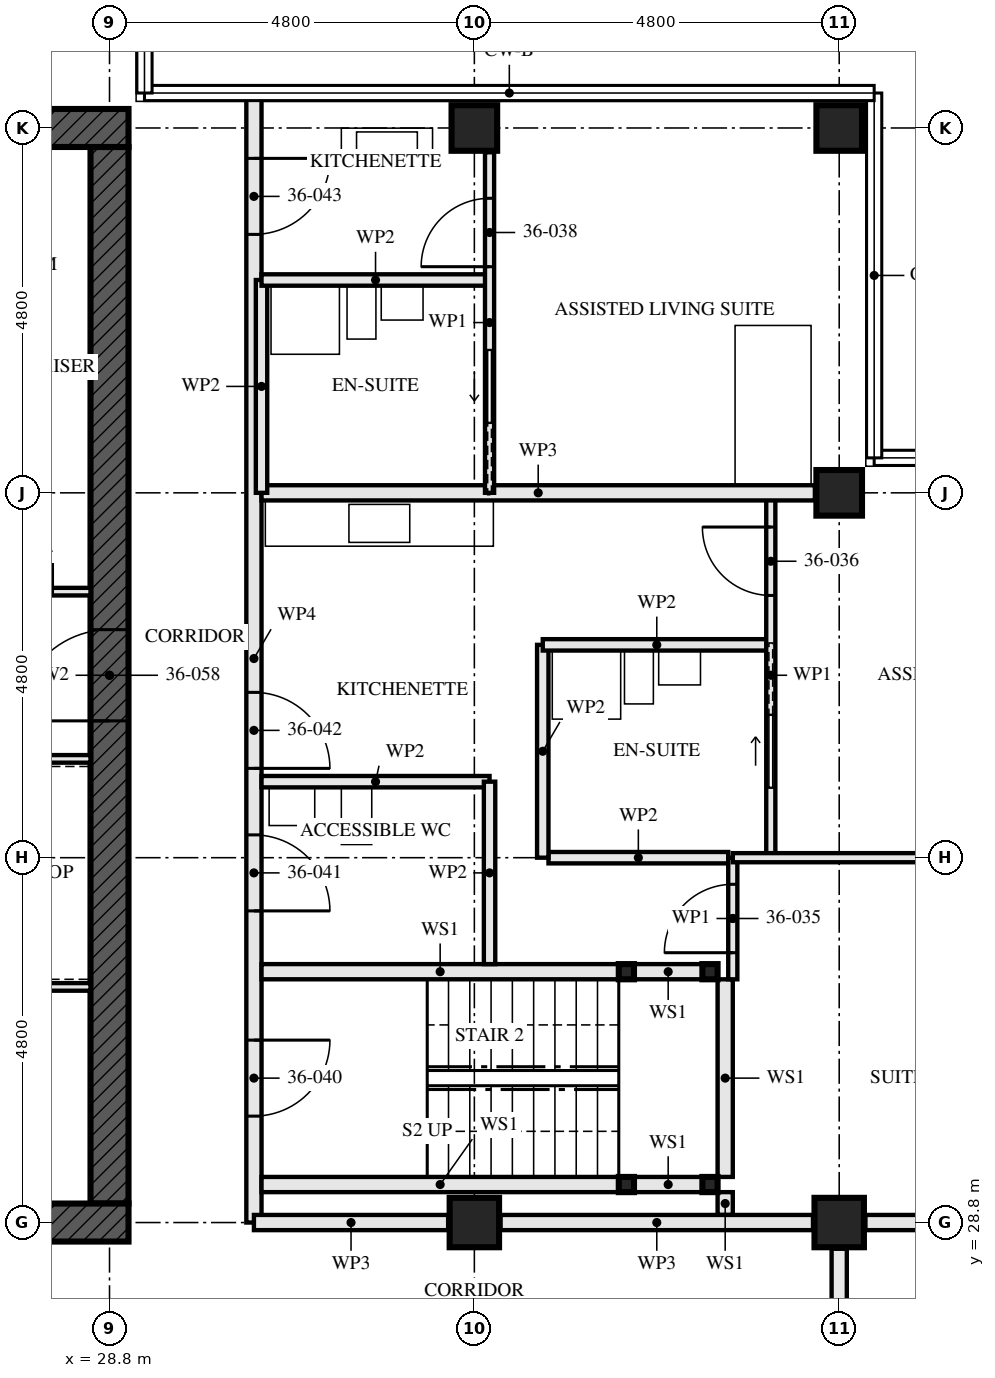
"""IFC4 building model, lengths in metres.
Left out: names, types, materials, properties, quantities, classifications, styles, units other than length and angle.
Written with IfcOpenShell. Run it as: python <this file> out.ifc"""

import sys

from ifc_helpers import new_model, si_unit, direction, frame, frame_2d, origin, origin_2d, place, context, subcontext, project, spatial, rectangle, hollow_rectangle, extrude, element, fill, save


model = new_model("IFC4")
c1 = context("Model", 3, precision=1e-05, world=origin(), true_north=direction((0.0, 1.0)))
c2 = subcontext(c1, "Body", "Model", "MODEL_VIEW")
j1 = project(units=[si_unit("LENGTHUNIT", "METRE"), si_unit("PLANEANGLEUNIT", "RADIAN")], contexts=[c1])
p1 = place(None, origin())
s1 = spatial("IfcSite", under=j1, at=p1, CompositionType="ELEMENT")
p2 = place(p1, origin())
s2 = spatial("IfcBuilding", under=s1, at=p2, CompositionType="ELEMENT")
p3 = place(p2, frame((0.0, 0.0, 133.0)))
s3 = spatial("IfcBuildingStorey", under=s2, at=p3, CompositionType="ELEMENT", Elevation=133.0)
p4 = place(p3, frame((33.6, 28.8, 0.0), z_axis=(0.0, 0.0, 1.0), x_axis=(0.0, 1.0, 0.0)))
e1 = element("IfcColumn", 1, at=p4, inside=s3, PredefinedType="COLUMN", context=c2, shape_type="SweptSolid", body=[
    extrude(hollow_rectangle(XDim=0.65, YDim=0.65, WallThickness=0.05, at=origin_2d()), origin(), (0.0, 0.0, 1.0), 3.5),
])
p5 = place(p3, frame((33.6, 43.2, 0.0), z_axis=(0.0, 0.0, 1.0), x_axis=(0.0, 1.0, 0.0)))
e2 = element("IfcColumn", 2, at=p5, inside=s3, PredefinedType="COLUMN", context=c2, shape_type="SweptSolid", body=[
    extrude(hollow_rectangle(XDim=0.6, YDim=0.6, WallThickness=0.08, at=origin_2d()), origin(), (0.0, 0.0, 1.0), 3.5),
])
p6 = place(p3, frame((38.4, 28.8, 0.0), z_axis=(0.0, 0.0, 1.0), x_axis=(0.0, 1.0, 0.0)))
e3 = element("IfcColumn", 3, at=p6, inside=s3, PredefinedType="COLUMN", context=c2, shape_type="SweptSolid", body=[
    extrude(hollow_rectangle(XDim=0.65, YDim=0.65, WallThickness=0.05, at=origin_2d()), origin(), (0.0, 0.0, 1.0), 3.5),
])
for number, where, z_axis, x_axis in (
    (4, (38.4, 38.4, 0.0), (0.0, 0.0, 1.0), (0.0, 1.0, 0.0)),
    (5, (38.4, 43.2, 0.0), (0.0, 0.0, 1.0), (0.0, 1.0, 0.0)),
):
    element("IfcColumn", number, at=place(p3, frame(where, z_axis=z_axis, x_axis=x_axis)), inside=s3, PredefinedType="COLUMN", context=c2, shape_type="SweptSolid", body=[
        extrude(hollow_rectangle(XDim=0.6, YDim=0.6, WallThickness=0.08, at=origin_2d()), origin(), (0.0, 0.0, 1.0), 3.5),
    ])
p7 = place(p3, frame((14.15, 28.8, -0.17), z_axis=(0.0, 0.0, 1.0), x_axis=(1.0, 0.0, 0.0)))
e6 = element("IfcWall", 6, at=p7, inside=s3, PredefinedType="SHEAR", context=c2, shape_type="SweptSolid", body=[
    extrude(rectangle(XDim=14.9, YDim=0.5, at=frame_2d((7.45, 0.0))), origin(), (0.0, 0.0, 1.0), 3.42),
])
p8 = place(p7, frame((6.85, 0.0, 0.17)))
e7 = element("IfcOpeningElement", 7, at=p8, cuts=e6, PredefinedType="OPENING", context=c2, shape_type="SweptSolid", body=[
    extrude(rectangle(XDim=1.2, YDim=2.1, at=frame_2d((0.6, 1.05))), frame((0.0, 0.26, 0.0), z_axis=(0.0, -1.0, 0.0), x_axis=(1.0, 0.0, 0.0)), (0.0, 0.0, 1.0), 0.521),
])
p9 = place(p3, frame((29.05, 43.2, -0.17), z_axis=(0.0, 0.0, 1.0), x_axis=(-1.0, 0.0, 0.0)))
e8 = element("IfcWall", 8, at=p9, inside=s3, PredefinedType="SHEAR", context=c2, shape_type="SweptSolid", body=[
    extrude(rectangle(XDim=14.9, YDim=0.5, at=frame_2d((7.45, 0.0))), origin(), (0.0, 0.0, 1.0), 3.42),
])
p10 = place(p9, frame((6.85, 0.0, 0.17)))
e9 = element("IfcOpeningElement", 9, at=p10, cuts=e8, PredefinedType="OPENING", context=c2, shape_type="SweptSolid", body=[
    extrude(rectangle(XDim=1.2, YDim=2.1, at=frame_2d((0.6, 1.05))), frame((0.0, 0.26, 0.0), z_axis=(0.0, -1.0, 0.0), x_axis=(1.0, 0.0, 0.0)), (0.0, 0.0, 1.0), 0.521),
])
p11 = place(p3, frame((28.8, 29.05, -0.17), z_axis=(0.0, 0.0, 1.0), x_axis=(0.0, 1.0, 0.0)))
e10 = element("IfcWall", 10, at=p11, inside=s3, PredefinedType="SHEAR", context=c2, shape_type="SweptSolid", body=[
    extrude(rectangle(XDim=13.9, YDim=0.5, at=frame_2d((6.95, 0.0))), origin(), (0.0, 0.0, 1.0), 3.42),
])
p12 = place(p11, frame((6.35, 0.0, 0.17)))
e11 = element("IfcOpeningElement", 11, at=p12, cuts=e10, PredefinedType="OPENING", context=c2, shape_type="SweptSolid", body=[
    extrude(rectangle(XDim=1.2, YDim=2.1, at=frame_2d((0.6, 1.05))), frame((0.0, 0.26, 0.0), z_axis=(0.0, -1.0, 0.0), x_axis=(1.0, 0.0, 0.0)), (0.0, 0.0, 1.0), 0.521),
])
for number, where, z_axis, x_axis in (
    (12, (36.7, 29.3, 0.0), (0.0, 0.0, 1.0), (1.0, 0.0, 0.0)),
    (13, (36.7, 32.1, 0.0), (0.0, 0.0, 1.0), (1.0, 0.0, 0.0)),
    (14, (35.6, 29.3, 0.0), (0.0, 0.0, 1.0), (1.0, 0.0, 0.0)),
    (15, (35.6, 32.1, 0.0), (0.0, 0.0, 1.0), (1.0, 0.0, 0.0)),
):
    element("IfcColumn", number, at=place(p3, frame(where, z_axis=z_axis, x_axis=x_axis)), inside=s3, PredefinedType="COLUMN", context=c2, shape_type="SweptSolid", body=[
        extrude(hollow_rectangle(XDim=0.2, YDim=0.2, WallThickness=0.008, at=origin_2d()), origin(), (0.0, 0.0, 1.0), 3.25),
    ])
p13 = place(p3, frame((38.4, 26.8, 0.0), z_axis=(0.0, 0.0, 1.0), x_axis=(0.0, 1.0, 0.0)))
e16 = element("IfcWall", 16, at=p13, inside=s3, PredefinedType="PARTITIONING", context=c2, shape_type="SweptSolid", body=[
    extrude(rectangle(XDim=1.655, YDim=0.2, at=frame_2d((0.828, 0.0))), origin(), (0.0, 0.0, 1.0), 3.25),
])
p14 = place(p3, frame((36.6, 29.3, 0.0), z_axis=(0.0, 0.0, 1.0), x_axis=(-1.0, 0.0, 0.0)))
e17 = element("IfcWall", 17, at=p14, inside=s3, PredefinedType="SOLIDWALL", context=c2, shape_type="SweptSolid", body=[
    extrude(rectangle(XDim=0.9, YDim=0.2, at=frame_2d((0.45, 0.0))), origin(), (0.0, 0.0, 1.0), 2.94),
])
p15 = place(p3, frame((35.5, 29.3, 0.0), z_axis=(0.0, 0.0, 1.0), x_axis=(-1.0, 0.0, 0.0)))
e18 = element("IfcWall", 18, at=p15, inside=s3, PredefinedType="SOLIDWALL", context=c2, shape_type="SweptSolid", body=[
    extrude(rectangle(XDim=4.7, YDim=0.2, at=frame_2d((2.35, 0.0))), origin(), (0.0, 0.0, 1.0), 2.94),
])
p16 = place(p3, frame((36.6, 32.1, 0.0), z_axis=(0.0, 0.0, 1.0), x_axis=(-1.0, 0.0, 0.0)))
e19 = element("IfcWall", 19, at=p16, inside=s3, PredefinedType="SOLIDWALL", context=c2, shape_type="SweptSolid", body=[
    extrude(rectangle(XDim=0.9, YDim=0.2, at=frame_2d((0.45, 0.0))), origin(), (0.0, 0.0, 1.0), 2.94),
])
p17 = place(p3, frame((35.5, 32.1, 0.0), z_axis=(0.0, 0.0, 1.0), x_axis=(-1.0, 0.0, 0.0)))
e20 = element("IfcWall", 20, at=p17, inside=s3, PredefinedType="SOLIDWALL", context=c2, shape_type="SweptSolid", body=[
    extrude(rectangle(XDim=4.7, YDim=0.2, at=frame_2d((2.35, 0.0))), origin(), (0.0, 0.0, 1.0), 2.94),
])
p18 = place(p3, frame((36.9, 28.9, 0.0), z_axis=(0.0, 0.0, 1.0), x_axis=(0.0, 1.0, 0.0)))
e21 = element("IfcWall", 21, at=p18, inside=s3, PredefinedType="SOLIDWALL", context=c2, shape_type="SweptSolid", body=[
    extrude(rectangle(XDim=0.3, YDim=0.2, at=frame_2d((0.15, 0.0))), origin(), (0.0, 0.0, 1.0), 3.25),
])
p19 = place(p3, frame((36.9, 29.4, 0.0), z_axis=(0.0, 0.0, 1.0), x_axis=(0.0, 1.0, 0.0)))
e22 = element("IfcWall", 22, at=p19, inside=s3, PredefinedType="SOLIDWALL", context=c2, shape_type="SweptSolid", body=[
    extrude(rectangle(XDim=2.6, YDim=0.2, at=frame_2d((1.3, 0.0))), origin(), (0.0, 0.0, 1.0), 3.25),
])
p20 = place(p3, frame((33.8, 32.2, 0.0), z_axis=(0.0, 0.0, 1.0), x_axis=(0.0, 1.0, 0.0)))
e23 = element("IfcWall", 23, at=p20, inside=s3, PredefinedType="PARTITIONING", context=c2, shape_type="SweptSolid", body=[
    extrude(rectangle(XDim=2.4, YDim=0.15, at=frame_2d((1.2, 0.0))), origin(), (0.0, 0.0, 1.0), 2.04),
])
for number, where, z_axis, x_axis in (
    (24, (33.8, 34.6, 0.0), (0.0, 0.0, 1.0), (-1.0, 0.0, 0.0)),
    (25, (37.5, 36.4, 0.0), (0.0, 0.0, 1.0), (-1.0, 0.0, 0.0)),
):
    element("IfcWall", number, at=place(p3, frame(where, z_axis=z_axis, x_axis=x_axis)), inside=s3, PredefinedType="PARTITIONING", context=c2, shape_type="SweptSolid", body=[
        extrude(rectangle(XDim=3.0, YDim=0.15, at=frame_2d((1.5, 0.0))), origin(), (0.0, 0.0, 1.0), 3.25),
    ])
p21 = place(p3, frame((34.5, 33.6, 0.0), z_axis=(0.0, 0.0, 1.0), x_axis=(0.0, 1.0, 0.0)))
e26 = element("IfcWall", 26, at=p21, inside=s3, PredefinedType="PARTITIONING", context=c2, shape_type="SweptSolid", body=[
    extrude(rectangle(XDim=2.8, YDim=0.15, at=frame_2d((1.4, 0.0))), origin(), (0.0, 0.0, 1.0), 3.25),
])
p22 = place(p3, frame((37.0, 32.0, 0.0), z_axis=(0.0, 0.0, 1.0), x_axis=(0.0, 1.0, 0.0)))
e27 = element("IfcWall", 27, at=p22, inside=s3, PredefinedType="PARTITIONING", context=c2, shape_type="SweptSolid", body=[
    extrude(rectangle(XDim=1.6, YDim=0.12, at=frame_2d((0.8, 0.0))), origin(), (0.0, 0.0, 1.0), 3.25),
])
p23 = place(p22, frame((0.35, 0.0, 0.0)))
e28 = element("IfcOpeningElement", 28, at=p23, cuts=e27, PredefinedType="OPENING", context=c2, shape_type="SweptSolid", body=[
    extrude(rectangle(XDim=0.9, YDim=2.1, at=frame_2d((0.45, 1.05))), frame((0.0, 0.071, 0.0), z_axis=(0.0, -1.0, 0.0), x_axis=(1.0, 0.0, 0.0)), (0.0, 0.0, 1.0), 0.141),
])
p24 = place(p3, frame((37.5, 33.6, 0.0), z_axis=(0.0, 0.0, 1.0), x_axis=(0.0, 1.0, 0.0)))
e29 = element("IfcWall", 29, at=p24, inside=s3, PredefinedType="PARTITIONING", context=c2, shape_type="SweptSolid", body=[
    extrude(rectangle(XDim=4.8, YDim=0.12, at=frame_2d((2.4, 0.0))), origin(), (0.0, 0.0, 1.0), 3.25),
])
p25 = place(p24, frame((3.45, 0.0, 0.0)))
e30 = element("IfcOpeningElement", 30, at=p25, cuts=e29, PredefinedType="OPENING", context=c2, shape_type="SweptSolid", body=[
    extrude(rectangle(XDim=0.9, YDim=2.1, at=frame_2d((0.45, 1.05))), frame((0.0, 0.071, 0.0), z_axis=(0.0, -1.0, 0.0), x_axis=(1.0, 0.0, 0.0)), (0.0, 0.0, 1.0), 0.141),
])
p26 = place(p24, frame((0.925, 0.0, 0.0)))
e31 = element("IfcOpeningElement", 31, at=p26, cuts=e29, PredefinedType="OPENING", context=c2, shape_type="SweptSolid", body=[
    extrude(rectangle(XDim=0.95, YDim=2.1, at=frame_2d((0.475, 1.05))), frame((0.0, 0.071, 0.0), z_axis=(0.0, -1.0, 0.0), x_axis=(1.0, 0.0, 0.0)), (0.0, 0.0, 1.0), 0.141),
])
p27 = place(p3, frame((42.88, 33.6, 0.0), z_axis=(0.0, 0.0, 1.0), x_axis=(-1.0, 0.0, 0.0)))
e32 = element("IfcWall", 32, at=p27, inside=s3, PredefinedType="PARTITIONING", context=c2, shape_type="SweptSolid", body=[
    extrude(rectangle(XDim=5.88, YDim=0.12, at=frame_2d((2.94, 0.0))), origin(), (0.0, 0.0, 1.0), 2.04),
])
p28 = place(p3, frame((38.08, 38.4, 0.0), z_axis=(0.0, 0.0, 1.0), x_axis=(-1.0, 0.0, 0.0)))
e33 = element("IfcWall", 33, at=p28, inside=s3, PredefinedType="PARTITIONING", context=c2, shape_type="SweptSolid", body=[
    extrude(rectangle(XDim=7.28, YDim=0.2, at=frame_2d((3.64, 0.0))), origin(), (0.0, 0.0, 1.0), 2.24),
])
p29 = place(p3, frame((33.8, 41.2, 0.0), z_axis=(0.0, 0.0, 1.0), x_axis=(-1.0, 0.0, 0.0)))
e34 = element("IfcWall", 34, at=p29, inside=s3, PredefinedType="PARTITIONING", context=c2, shape_type="SweptSolid", body=[
    extrude(rectangle(XDim=3.0, YDim=0.15, at=frame_2d((1.5, 0.0))), origin(), (0.0, 0.0, 1.0), 3.25),
])
p30 = place(p3, frame((30.8, 38.4, 0.0), z_axis=(0.0, 0.0, 1.0), x_axis=(0.0, 1.0, 0.0)))
e35 = element("IfcWall", 35, at=p30, inside=s3, PredefinedType="PARTITIONING", context=c2, shape_type="SweptSolid", body=[
    extrude(rectangle(XDim=2.8, YDim=0.15, at=frame_2d((1.4, 0.0))), origin(), (0.0, 0.0, 1.0), 3.25),
])
p31 = place(p3, frame((33.8, 38.4, 0.0), z_axis=(0.0, 0.0, 1.0), x_axis=(0.0, 1.0, 0.0)))
e36 = element("IfcWall", 36, at=p31, inside=s3, PredefinedType="PARTITIONING", context=c2, shape_type="SweptSolid", body=[
    extrude(rectangle(XDim=4.48, YDim=0.12, at=frame_2d((2.24, 0.0))), origin(), (0.0, 0.0, 1.0), 3.25),
])
p32 = place(p31, frame((2.975, 0.0, 0.0)))
e37 = element("IfcOpeningElement", 37, at=p32, cuts=e36, PredefinedType="OPENING", context=c2, shape_type="SweptSolid", body=[
    extrude(rectangle(XDim=0.9, YDim=2.1, at=frame_2d((0.45, 1.05))), frame((0.0, 0.071, 0.0), z_axis=(0.0, -1.0, 0.0), x_axis=(1.0, 0.0, 0.0)), (0.0, 0.0, 1.0), 0.141),
])
p33 = place(p31, frame((0.925, 0.0, 0.0)))
e38 = element("IfcOpeningElement", 38, at=p33, cuts=e36, PredefinedType="OPENING", context=c2, shape_type="SweptSolid", body=[
    extrude(rectangle(XDim=0.95, YDim=2.1, at=frame_2d((0.475, 1.05))), frame((0.0, 0.071, 0.0), z_axis=(0.0, -1.0, 0.0), x_axis=(1.0, 0.0, 0.0)), (0.0, 0.0, 1.0), 0.141),
])
p34 = place(p3, frame((30.7, 28.8, 0.0), z_axis=(0.0, 0.0, 1.0), x_axis=(0.0, 1.0, 0.0)))
e39 = element("IfcWall", 39, at=p34, inside=s3, PredefinedType="PARTITIONING", context=c2, shape_type="SweptSolid", body=[
    extrude(rectangle(XDim=14.84, YDim=0.2, at=frame_2d((7.42, 0.0))), origin(), (0.0, 0.0, 1.0), 2.04),
])
p35 = place(p34, frame((1.4, 0.0, 0.0)))
e40 = element("IfcOpeningElement", 40, at=p35, cuts=e39, PredefinedType="OPENING", context=c2, shape_type="SweptSolid", body=[
    extrude(rectangle(XDim=1.0, YDim=2.0, at=frame_2d((0.5, 1.0))), frame((0.0, 0.111, 0.0), z_axis=(0.0, -1.0, 0.0), x_axis=(1.0, 0.0, 0.0)), (0.0, 0.0, 1.0), 0.221),
])
p36 = place(p34, frame((4.1, 0.0, 0.0)))
e41 = element("IfcOpeningElement", 41, at=p36, cuts=e39, PredefinedType="OPENING", context=c2, shape_type="SweptSolid", body=[
    extrude(rectangle(XDim=1.0, YDim=2.0, at=frame_2d((0.5, 1.0))), frame((0.0, 0.111, 0.0), z_axis=(0.0, -1.0, 0.0), x_axis=(1.0, 0.0, 0.0)), (0.0, 0.0, 1.0), 0.221),
])
p37 = place(p34, frame((5.975, 0.0, 0.0)))
e42 = element("IfcOpeningElement", 42, at=p37, cuts=e39, PredefinedType="OPENING", context=c2, shape_type="SweptSolid", body=[
    extrude(rectangle(XDim=1.0, YDim=2.0, at=frame_2d((0.5, 1.0))), frame((0.0, 0.111, 0.0), z_axis=(0.0, -1.0, 0.0), x_axis=(1.0, 0.0, 0.0)), (0.0, 0.0, 1.0), 0.221),
])
p38 = place(p34, frame((13.0, 0.0, 0.0)))
e43 = element("IfcOpeningElement", 43, at=p38, cuts=e39, PredefinedType="OPENING", context=c2, shape_type="SweptSolid", body=[
    extrude(rectangle(XDim=1.0, YDim=2.0, at=frame_2d((0.5, 1.0))), frame((0.0, 0.111, 0.0), z_axis=(0.0, -1.0, 0.0), x_axis=(1.0, 0.0, 0.0)), (0.0, 0.0, 1.0), 0.221),
])
p39 = place(p3, frame((23.05, 34.9, 0.0), z_axis=(0.0, 0.0, 1.0), x_axis=(1.0, 0.0, 0.0)))
e44 = element("IfcWall", 44, at=p39, inside=s3, PredefinedType="SOLIDWALL", context=c2, shape_type="SweptSolid", body=[
    extrude(rectangle(XDim=5.5, YDim=0.1, at=frame_2d((2.75, 0.0))), origin(), (0.0, 0.0, 1.0), 3.25),
])
p40 = place(p3, frame((22.65, 37.1, 0.0), z_axis=(0.0, 0.0, 1.0), x_axis=(1.0, 0.0, 0.0)))
e45 = element("IfcWall", 45, at=p40, inside=s3, PredefinedType="SOLIDWALL", context=c2, shape_type="SweptSolid", body=[
    extrude(rectangle(XDim=5.9, YDim=0.1, at=frame_2d((2.95, 0.0))), origin(), (0.0, 0.0, 1.0), 3.25),
])
p41 = place(p40, frame((3.15, 0.0, 0.0)))
e46 = element("IfcOpeningElement", 46, at=p41, cuts=e45, PredefinedType="OPENING", context=c2, shape_type="SweptSolid", body=[
    extrude(rectangle(XDim=0.9, YDim=2.1, at=frame_2d((0.45, 1.05))), frame((0.0, 0.061, 0.0), z_axis=(0.0, -1.0, 0.0), x_axis=(1.0, 0.0, 0.0)), (0.0, 0.0, 1.0), 0.121),
])
p42 = place(p40, frame((4.7, 0.0, 0.0)))
e47 = element("IfcOpeningElement", 47, at=p42, cuts=e45, PredefinedType="OPENING", context=c2, shape_type="SweptSolid", body=[
    extrude(rectangle(XDim=0.7, YDim=2.1, at=frame_2d((0.35, 1.05))), frame((0.0, 0.061, 0.0), z_axis=(0.0, -1.0, 0.0), x_axis=(1.0, 0.0, 0.0)), (0.0, 0.0, 1.0), 0.121),
])
p43 = place(p3, frame((23.15, 31.9, 0.0), z_axis=(0.0, 0.0, 1.0), x_axis=(1.0, 0.0, 0.0)))
e48 = element("IfcWall", 48, at=p43, inside=s3, PredefinedType="SOLIDWALL", context=c2, shape_type="SweptSolid", body=[
    extrude(rectangle(XDim=5.4, YDim=0.1, at=frame_2d((2.7, 0.0))), origin(), (0.0, 0.0, 1.0), 3.25),
])
p44 = place(p3, frame((42.88, 28.8, 0.0), z_axis=(0.0, 0.0, 1.0), x_axis=(-1.0, 0.0, 0.0)))
e49 = element("IfcWall", 49, at=p44, inside=s3, PredefinedType="PARTITIONING", context=c2, shape_type="SweptSolid", body=[
    extrude(rectangle(XDim=4.135, YDim=0.2, at=frame_2d((2.067, 0.0))), origin(), (0.0, 0.0, 1.0), 2.04),
])
p45 = place(p3, frame((38.055, 28.8, 0.0), z_axis=(0.0, 0.0, 1.0), x_axis=(-1.0, 0.0, 0.0)))
e50 = element("IfcWall", 50, at=p45, inside=s3, PredefinedType="PARTITIONING", context=c2, shape_type="SweptSolid", body=[
    extrude(rectangle(XDim=4.11, YDim=0.2, at=frame_2d((2.055, 0.0))), origin(), (0.0, 0.0, 1.0), 2.04),
])
p46 = place(p3, frame((33.255, 28.8, 0.0), z_axis=(0.0, 0.0, 1.0), x_axis=(-1.0, 0.0, 0.0)))
e51 = element("IfcWall", 51, at=p46, inside=s3, PredefinedType="PARTITIONING", context=c2, shape_type="SweptSolid", body=[
    extrude(rectangle(XDim=2.555, YDim=0.2, at=frame_2d((1.277, 0.0))), origin(), (0.0, 0.0, 1.0), 2.04),
])
p47 = place(p3, frame((36.94, 33.6, 0.0), z_axis=(0.0, 0.0, 1.0), x_axis=(-1.0, 0.0, 0.0)))
e52 = element("IfcWall", 52, at=p47, inside=s3, PredefinedType="PARTITIONING", context=c2, shape_type="SweptSolid", body=[
    extrude(rectangle(XDim=2.365, YDim=0.15, at=frame_2d((1.183, 0.0))), origin(), (0.0, 0.0, 1.0), 2.04),
])
p48 = place(p23, origin())
e53 = element("IfcDoor", 53, at=p48, inside=s3, OperationType="SINGLE_SWING_RIGHT", PredefinedType="DOOR", context=c2, shape_type="SweptSolid", body=[
    extrude(rectangle(XDim=0.9, YDim=2.1, at=frame_2d((0.45, 1.05))), frame((0.0, 0.022, 0.0), z_axis=(0.0, -1.0, 0.0), x_axis=(1.0, 0.0, 0.0)), (0.0, 0.0, 1.0), 0.044),
])
fill(e28, e53)
p49 = place(p25, origin())
e54 = element("IfcDoor", 54, at=p49, inside=s3, OperationType="SINGLE_SWING_LEFT", PredefinedType="DOOR", context=c2, shape_type="SweptSolid", body=[
    extrude(rectangle(XDim=0.9, YDim=2.1, at=frame_2d((0.45, 1.05))), frame((0.0, 0.022, 0.0), z_axis=(0.0, -1.0, 0.0), x_axis=(1.0, 0.0, 0.0)), (0.0, 0.0, 1.0), 0.044),
])
fill(e30, e54)
p50 = place(p26, origin())
e55 = element("IfcDoor", 55, at=p50, inside=s3, OperationType="SLIDING_TO_LEFT", PredefinedType="DOOR", context=c2, shape_type="SweptSolid", body=[
    extrude(rectangle(XDim=0.95, YDim=2.1, at=frame_2d((0.475, 1.05))), frame((0.0, 0.022, 0.0), z_axis=(0.0, -1.0, 0.0), x_axis=(1.0, 0.0, 0.0)), (0.0, 0.0, 1.0), 0.044),
])
fill(e31, e55)
p51 = place(p32, origin())
e56 = element("IfcDoor", 56, at=p51, inside=s3, OperationType="SINGLE_SWING_RIGHT", PredefinedType="DOOR", context=c2, shape_type="SweptSolid", body=[
    extrude(rectangle(XDim=0.9, YDim=2.1, at=frame_2d((0.45, 1.05))), frame((0.0, 0.022, 0.0), z_axis=(0.0, -1.0, 0.0), x_axis=(1.0, 0.0, 0.0)), (0.0, 0.0, 1.0), 0.044),
])
fill(e37, e56)
p52 = place(p33, origin())
e57 = element("IfcDoor", 57, at=p52, inside=s3, OperationType="SLIDING_TO_RIGHT", PredefinedType="DOOR", context=c2, shape_type="SweptSolid", body=[
    extrude(rectangle(XDim=0.95, YDim=2.1, at=frame_2d((0.475, 1.05))), frame((0.0, 0.022, 0.0), z_axis=(0.0, -1.0, 0.0), x_axis=(1.0, 0.0, 0.0)), (0.0, 0.0, 1.0), 0.044),
])
fill(e38, e57)
p53 = place(p35, frame((1.0, 0.0, 0.0), z_axis=(0.0, 0.0, 1.0), x_axis=(-1.0, 0.0, 0.0)))
e58 = element("IfcDoor", 58, at=p53, inside=s3, OperationType="SINGLE_SWING_RIGHT", PredefinedType="DOOR", context=c2, shape_type="SweptSolid", body=[
    extrude(rectangle(XDim=1.0, YDim=2.0, at=frame_2d((0.5, 1.0))), frame((0.0, 0.032, 0.0), z_axis=(0.0, -1.0, 0.0), x_axis=(1.0, 0.0, 0.0)), (0.0, 0.0, 1.0), 0.064),
])
fill(e40, e58)
p54 = place(p36, frame((1.0, 0.0, 0.0), z_axis=(0.0, 0.0, 1.0), x_axis=(-1.0, 0.0, 0.0)))
e59 = element("IfcDoor", 59, at=p54, inside=s3, OperationType="SINGLE_SWING_LEFT", PredefinedType="DOOR", context=c2, shape_type="SweptSolid", body=[
    extrude(rectangle(XDim=1.0, YDim=2.0, at=frame_2d((0.5, 1.0))), frame((0.0, 0.027, 0.0), z_axis=(0.0, -1.0, 0.0), x_axis=(1.0, 0.0, 0.0)), (0.0, 0.0, 1.0), 0.054),
])
fill(e41, e59)
p55 = place(p37, frame((1.0, 0.0, 0.0), z_axis=(0.0, 0.0, 1.0), x_axis=(-1.0, 0.0, 0.0)))
e60 = element("IfcDoor", 60, at=p55, inside=s3, OperationType="SINGLE_SWING_LEFT", PredefinedType="DOOR", context=c2, shape_type="SweptSolid", body=[
    extrude(rectangle(XDim=1.0, YDim=2.0, at=frame_2d((0.5, 1.0))), frame((0.0, 0.027, 0.0), z_axis=(0.0, -1.0, 0.0), x_axis=(1.0, 0.0, 0.0)), (0.0, 0.0, 1.0), 0.054),
])
fill(e42, e60)
p56 = place(p38, frame((1.0, 0.0, 0.0), z_axis=(0.0, 0.0, 1.0), x_axis=(-1.0, 0.0, 0.0)))
e61 = element("IfcDoor", 61, at=p56, inside=s3, OperationType="SINGLE_SWING_RIGHT", PredefinedType="DOOR", context=c2, shape_type="SweptSolid", body=[
    extrude(rectangle(XDim=1.0, YDim=2.0, at=frame_2d((0.5, 1.0))), frame((0.0, 0.027, 0.0), z_axis=(0.0, -1.0, 0.0), x_axis=(1.0, 0.0, 0.0)), (0.0, 0.0, 1.0), 0.054),
])
fill(e43, e61)
p57 = place(p12, origin())
e62 = element("IfcDoor", 62, at=p57, inside=s3, OperationType="SINGLE_SWING_LEFT", PredefinedType="DOOR", context=c2, shape_type="SweptSolid", body=[
    extrude(rectangle(XDim=1.2, YDim=2.1, at=frame_2d((0.6, 1.05))), frame((0.0, 0.027, 0.0), z_axis=(0.0, -1.0, 0.0), x_axis=(1.0, 0.0, 0.0)), (0.0, 0.0, 1.0), 0.054),
])
fill(e11, e62)
save(model, sys.argv[1])
